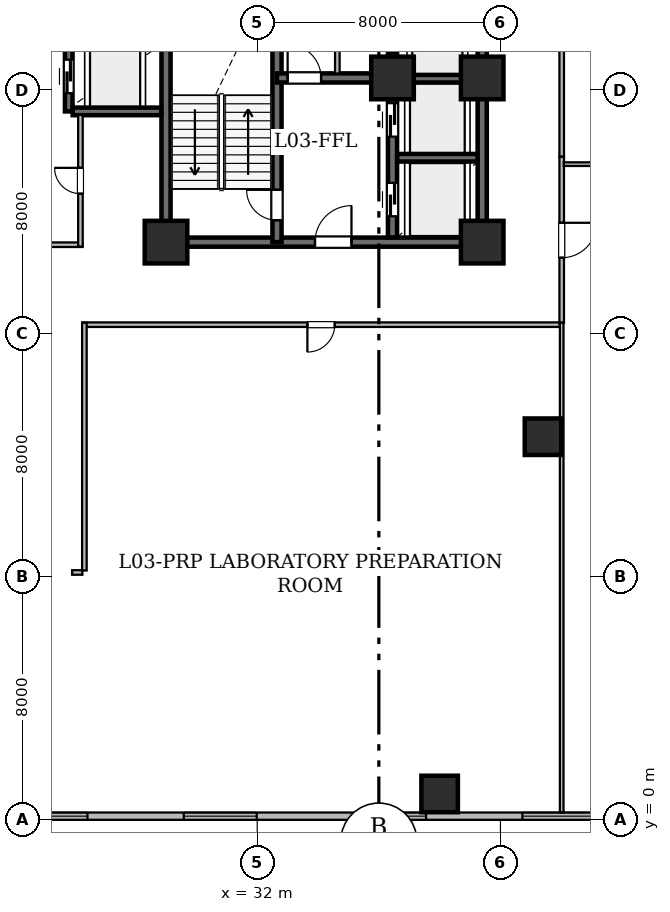
"""IFC4 building model, lengths in metres.
Left out: names, types, materials, properties, quantities, classifications, styles, units other than length and angle.
Written with IfcOpenShell. Run it as: python <this file> out.ifc"""

import sys

from ifc_helpers import new_model, si_unit, direction, frame, frame_2d, origin, origin_2d, place, context, subcontext, project, spatial, rectangle, hollow_rectangle, extrude, element, fill, save


model = new_model("IFC4")
c1 = context("Model", 3, precision=1e-05, world=origin(), true_north=direction((0.0, 1.0)))
c2 = subcontext(c1, "Body", "Model", "MODEL_VIEW")
j1 = project(units=[si_unit("LENGTHUNIT", "METRE"), si_unit("PLANEANGLEUNIT", "RADIAN")], contexts=[c1])
p1 = place(None, origin())
s1 = spatial("IfcSite", under=j1, at=p1, CompositionType="ELEMENT")
p2 = place(p1, origin())
s2 = spatial("IfcBuilding", under=s1, at=p2, CompositionType="ELEMENT")
p3 = place(p2, frame((0.0, 0.0, 16.2)))
s3 = spatial("IfcBuildingStorey", under=s2, at=p3, CompositionType="ELEMENT", Elevation=16.2)
for number, where, z_axis, x_axis in (
    (1, (29.0, 19.0, 0.0), (0.0, 0.0, 1.0), (1.0, 0.0, 0.0)),
    (2, (39.4, 19.0, 0.0), (0.0, 0.0, 1.0), (1.0, 0.0, 0.0)),
    (3, (36.45, 24.4, 0.0), (0.0, 0.0, 1.0), (1.0, 0.0, 0.0)),
    (4, (39.4, 24.4, 0.0), (0.0, 0.0, 1.0), (1.0, 0.0, 0.0)),
):
    element("IfcColumn", number, at=place(p3, frame(where, z_axis=z_axis, x_axis=x_axis)), inside=s3, PredefinedType="COLUMN", context=c2, shape_type="SweptSolid", body=[
        extrude(hollow_rectangle(XDim=1.4, YDim=1.4, WallThickness=0.07, at=origin_2d()), origin(), (0.0, 0.0, 1.0), 4.2),
    ])
for number, where, z_axis, x_axis in (
    (5, (38.0, 0.85, 0.0), (0.0, 0.0, 1.0), (1.0, 0.0, 0.0)),
    (6, (41.4, 12.6, 0.0), (0.0, 0.0, 1.0), (1.0, 0.0, 0.0)),
):
    element("IfcColumn", number, at=place(p3, frame(where, z_axis=z_axis, x_axis=x_axis)), inside=s3, PredefinedType="COLUMN", context=c2, shape_type="SweptSolid", body=[
        extrude(hollow_rectangle(XDim=1.2, YDim=1.2, WallThickness=0.06, at=origin_2d()), origin(), (0.0, 0.0, 1.0), 4.2),
    ])
p4 = place(p3, frame((50.275, 0.12, 0.0), z_axis=(0.0, 0.0, 1.0), x_axis=(-1.0, 0.0, 0.0)))
e7 = element("IfcWall", 7, at=p4, inside=s3, PredefinedType="STANDARD", context=c2, shape_type="SweptSolid", body=[
    extrude(rectangle(XDim=44.55, YDim=0.24, at=frame_2d((22.275, 0.0))), origin(), (0.0, 0.0, 1.0), 3.92),
])
p5 = place(p4, frame((1.584, 0.0, 0.9)))
e8 = element("IfcOpeningElement", 8, at=p5, cuts=e7, PredefinedType="OPENING", context=c2, shape_type="SweptSolid", body=[
    extrude(rectangle(XDim=2.4, YDim=1.7, at=frame_2d((1.2, 0.85))), frame((0.0, 0.13, 0.0), z_axis=(0.0, -1.0, 0.0), x_axis=(1.0, 0.0, 0.0)), (0.0, 0.0, 1.0), 0.26),
])
p6 = place(p4, frame((7.153, 0.0, 0.9)))
e9 = element("IfcOpeningElement", 9, at=p6, cuts=e7, PredefinedType="OPENING", context=c2, shape_type="SweptSolid", body=[
    extrude(rectangle(XDim=2.4, YDim=1.7, at=frame_2d((1.2, 0.85))), frame((0.0, 0.13, 0.0), z_axis=(0.0, -1.0, 0.0), x_axis=(1.0, 0.0, 0.0)), (0.0, 0.0, 1.0), 0.26),
])
p7 = place(p4, frame((12.722, 0.0, 0.9)))
e10 = element("IfcOpeningElement", 10, at=p7, cuts=e7, PredefinedType="OPENING", context=c2, shape_type="SweptSolid", body=[
    extrude(rectangle(XDim=2.4, YDim=1.7, at=frame_2d((1.2, 0.85))), frame((0.0, 0.13, 0.0), z_axis=(0.0, -1.0, 0.0), x_axis=(1.0, 0.0, 0.0)), (0.0, 0.0, 1.0), 0.26),
])
p8 = place(p4, frame((18.291, 0.0, 0.9)))
e11 = element("IfcOpeningElement", 11, at=p8, cuts=e7, PredefinedType="OPENING", context=c2, shape_type="SweptSolid", body=[
    extrude(rectangle(XDim=2.4, YDim=1.7, at=frame_2d((1.2, 0.85))), frame((0.0, 0.13, 0.0), z_axis=(0.0, -1.0, 0.0), x_axis=(1.0, 0.0, 0.0)), (0.0, 0.0, 1.0), 0.26),
])
p9 = place(p4, frame((23.859, 0.0, 0.9)))
e12 = element("IfcOpeningElement", 12, at=p9, cuts=e7, PredefinedType="OPENING", context=c2, shape_type="SweptSolid", body=[
    extrude(rectangle(XDim=2.4, YDim=1.7, at=frame_2d((1.2, 0.85))), frame((0.0, 0.13, 0.0), z_axis=(0.0, -1.0, 0.0), x_axis=(1.0, 0.0, 0.0)), (0.0, 0.0, 1.0), 0.26),
])
p10 = place(p4, frame((29.428, 0.0, 0.9)))
e13 = element("IfcOpeningElement", 13, at=p10, cuts=e7, PredefinedType="OPENING", context=c2, shape_type="SweptSolid", body=[
    extrude(rectangle(XDim=2.4, YDim=1.7, at=frame_2d((1.2, 0.85))), frame((0.0, 0.13, 0.0), z_axis=(0.0, -1.0, 0.0), x_axis=(1.0, 0.0, 0.0)), (0.0, 0.0, 1.0), 0.26),
])
p11 = place(p4, frame((34.997, 0.0, 0.9)))
e14 = element("IfcOpeningElement", 14, at=p11, cuts=e7, PredefinedType="OPENING", context=c2, shape_type="SweptSolid", body=[
    extrude(rectangle(XDim=2.4, YDim=1.7, at=frame_2d((1.2, 0.85))), frame((0.0, 0.13, 0.0), z_axis=(0.0, -1.0, 0.0), x_axis=(1.0, 0.0, 0.0)), (0.0, 0.0, 1.0), 0.26),
])
p12 = place(p4, frame((40.566, 0.0, 0.9)))
e15 = element("IfcOpeningElement", 15, at=p12, cuts=e7, PredefinedType="OPENING", context=c2, shape_type="SweptSolid", body=[
    extrude(rectangle(XDim=2.4, YDim=1.7, at=frame_2d((1.2, 0.85))), frame((0.0, 0.13, 0.0), z_axis=(0.0, -1.0, 0.0), x_axis=(1.0, 0.0, 0.0)), (0.0, 0.0, 1.0), 0.26),
])
p13 = place(p3, frame((29.0, 19.0, 0.0), z_axis=(0.0, 0.0, 1.0), x_axis=(0.0, 1.0, 0.0)))
e16 = element("IfcWall", 16, at=p13, inside=s3, PredefinedType="SHEAR", context=c2, shape_type="SweptSolid", body=[
    extrude(rectangle(XDim=9.0, YDim=0.3, at=frame_2d((4.5, 0.0))), origin(), (0.0, 0.0, 1.0), 3.92),
])
p14 = place(p3, frame((29.0, 19.0, 0.0), z_axis=(0.0, 0.0, 1.0), x_axis=(1.0, 0.0, 0.0)))
e17 = element("IfcWall", 17, at=p14, inside=s3, PredefinedType="SHEAR", context=c2, shape_type="SweptSolid", body=[
    extrude(rectangle(XDim=10.4, YDim=0.3, at=frame_2d((5.2, 0.0))), origin(), (0.0, 0.0, 1.0), 3.92),
])
p15 = place(p14, frame((4.9, 0.0, 0.0)))
e18 = element("IfcOpeningElement", 18, at=p15, cuts=e17, PredefinedType="OPENING", context=c2, shape_type="SweptSolid", body=[
    extrude(rectangle(XDim=1.2, YDim=2.15, at=frame_2d((0.6, 1.075))), frame((0.0, 0.16, 0.0), z_axis=(0.0, -1.0, 0.0), x_axis=(1.0, 0.0, 0.0)), (0.0, 0.0, 1.0), 0.32),
])
p16 = place(p3, frame((39.4, 19.0, 0.0), z_axis=(0.0, 0.0, 1.0), x_axis=(0.0, 1.0, 0.0)))
e19 = element("IfcWall", 19, at=p16, inside=s3, PredefinedType="SHEAR", context=c2, shape_type="SweptSolid", body=[
    extrude(rectangle(XDim=5.4, YDim=0.3, at=frame_2d((2.7, 0.0))), origin(), (0.0, 0.0, 1.0), 3.92),
])
p17 = place(p3, frame((39.4, 24.4, 0.0), z_axis=(0.0, 0.0, 1.0), x_axis=(0.0, 1.0, 0.0)))
e20 = element("IfcWall", 20, at=p17, inside=s3, PredefinedType="SHEAR", context=c2, shape_type="SweptSolid", body=[
    extrude(rectangle(XDim=12.6, YDim=0.3, at=frame_2d((6.3, 0.0))), origin(), (0.0, 0.0, 1.0), 3.92),
])
p18 = place(p3, frame((32.65, 19.0, 0.0), z_axis=(0.0, 0.0, 1.0), x_axis=(0.0, 1.0, 0.0)))
e21 = element("IfcWall", 21, at=p18, inside=s3, PredefinedType="SHEAR", context=c2, shape_type="SweptSolid", body=[
    extrude(rectangle(XDim=9.0, YDim=0.3, at=frame_2d((4.5, 0.0))), origin(), (0.0, 0.0, 1.0), 3.92),
])
p19 = place(p18, frame((0.72, 0.0, 0.0)))
e22 = element("IfcOpeningElement", 22, at=p19, cuts=e21, PredefinedType="OPENING", context=c2, shape_type="SweptSolid", body=[
    extrude(rectangle(XDim=1.0, YDim=2.15, at=frame_2d((0.5, 1.075))), frame((0.0, 0.16, 0.0), z_axis=(0.0, -1.0, 0.0), x_axis=(1.0, 0.0, 0.0)), (0.0, 0.0, 1.0), 0.32),
])
p20 = place(p3, frame((32.65, 24.4, 0.0), z_axis=(0.0, 0.0, 1.0), x_axis=(1.0, 0.0, 0.0)))
e23 = element("IfcWall", 23, at=p20, inside=s3, PredefinedType="SHEAR", context=c2, shape_type="SweptSolid", body=[
    extrude(rectangle(XDim=3.8, YDim=0.3, at=frame_2d((1.9, 0.0))), origin(), (0.0, 0.0, 1.0), 3.92),
])
p21 = place(p20, frame((0.35, 0.0, 0.0)))
e24 = element("IfcOpeningElement", 24, at=p21, cuts=e23, PredefinedType="OPENING", context=c2, shape_type="SweptSolid", body=[
    extrude(rectangle(XDim=1.1, YDim=2.15, at=frame_2d((0.55, 1.075))), frame((0.0, 0.16, 0.0), z_axis=(0.0, -1.0, 0.0), x_axis=(1.0, 0.0, 0.0)), (0.0, 0.0, 1.0), 0.32),
])
p22 = place(p3, frame((36.45, 19.154, 0.0), z_axis=(0.0, 0.0, 1.0), x_axis=(0.0, 1.0, 0.0)))
e25 = element("IfcWall", 25, at=p22, inside=s3, PredefinedType="SHEAR", context=c2, shape_type="SweptSolid", body=[
    extrude(rectangle(XDim=4.546, YDim=0.3, at=frame_2d((2.273, 0.0))), origin(), (0.0, 0.0, 1.0), 3.92),
])
p23 = place(p22, frame((0.696, 0.0, 0.0)))
e26 = element("IfcOpeningElement", 26, at=p23, cuts=e25, PredefinedType="OPENING", context=c2, shape_type="SweptSolid", body=[
    extrude(rectangle(XDim=1.1, YDim=2.15, at=frame_2d((0.55, 1.075))), frame((0.0, 0.16, 0.0), z_axis=(0.0, -1.0, 0.0), x_axis=(1.0, 0.0, 0.0)), (0.0, 0.0, 1.0), 0.32),
])
p24 = place(p22, frame((3.316, 0.0, 0.0)))
e27 = element("IfcOpeningElement", 27, at=p24, cuts=e25, PredefinedType="OPENING", context=c2, shape_type="SweptSolid", body=[
    extrude(rectangle(XDim=1.1, YDim=2.15, at=frame_2d((0.55, 1.075))), frame((0.0, 0.16, 0.0), z_axis=(0.0, -1.0, 0.0), x_axis=(1.0, 0.0, 0.0)), (0.0, 0.0, 1.0), 0.32),
])
p25 = place(p3, frame((36.45, 25.1, 0.0), z_axis=(0.0, 0.0, 1.0), x_axis=(0.0, 1.0, 0.0)))
e28 = element("IfcWall", 28, at=p25, inside=s3, PredefinedType="SHEAR", context=c2, shape_type="SweptSolid", body=[
    extrude(rectangle(XDim=4.95, YDim=0.3, at=frame_2d((2.475, 0.0))), origin(), (0.0, 0.0, 1.0), 3.92),
])
p26 = place(p25, frame((0.12, 0.0, 0.0)))
e29 = element("IfcOpeningElement", 29, at=p26, cuts=e28, PredefinedType="OPENING", context=c2, shape_type="SweptSolid", body=[
    extrude(rectangle(XDim=1.05, YDim=2.15, at=frame_2d((0.525, 1.075))), frame((0.0, 0.16, 0.0), z_axis=(0.0, -1.0, 0.0), x_axis=(1.0, 0.0, 0.0)), (0.0, 0.0, 1.0), 0.32),
])
p27 = place(p25, frame((1.995, 0.0, 0.0)))
e30 = element("IfcOpeningElement", 30, at=p27, cuts=e28, PredefinedType="OPENING", context=c2, shape_type="SweptSolid", body=[
    extrude(rectangle(XDim=1.05, YDim=2.15, at=frame_2d((0.525, 1.075))), frame((0.0, 0.16, 0.0), z_axis=(0.0, -1.0, 0.0), x_axis=(1.0, 0.0, 0.0)), (0.0, 0.0, 1.0), 0.32),
])
p28 = place(p25, frame((3.795, 0.0, 0.0)))
e31 = element("IfcOpeningElement", 31, at=p28, cuts=e28, PredefinedType="OPENING", context=c2, shape_type="SweptSolid", body=[
    extrude(rectangle(XDim=1.05, YDim=2.15, at=frame_2d((0.525, 1.075))), frame((0.0, 0.16, 0.0), z_axis=(0.0, -1.0, 0.0), x_axis=(1.0, 0.0, 0.0)), (0.0, 0.0, 1.0), 0.32),
])
for number, where, z_axis, x_axis in (
    (32, (36.604, 21.775, 0.0), (0.0, 0.0, 1.0), (1.0, 0.0, 0.0)),
    (33, (36.604, 24.375, 0.0), (0.0, 0.0, 1.0), (1.0, 0.0, 0.0)),
):
    element("IfcWall", number, at=place(p3, frame(where, z_axis=z_axis, x_axis=x_axis)), inside=s3, PredefinedType="SHEAR", context=c2, shape_type="SweptSolid", body=[
        extrude(rectangle(XDim=2.642, YDim=0.25, at=frame_2d((1.321, 0.0))), origin(), (0.0, 0.0, 1.0), 3.92),
    ])
p29 = place(p3, frame((25.8, 23.3, 0.0), z_axis=(0.0, 0.0, 1.0), x_axis=(0.0, 1.0, 0.0)))
e34 = element("IfcWall", 34, at=p29, inside=s3, PredefinedType="SHEAR", context=c2, shape_type="SweptSolid", body=[
    extrude(rectangle(XDim=4.55, YDim=0.25, at=frame_2d((2.275, 0.0))), origin(), (0.0, 0.0, 1.0), 3.92),
])
p30 = place(p29, frame((0.6, 0.0, 0.0)))
e35 = element("IfcOpeningElement", 35, at=p30, cuts=e34, PredefinedType="OPENING", context=c2, shape_type="SweptSolid", body=[
    extrude(rectangle(XDim=1.1, YDim=2.15, at=frame_2d((0.55, 1.075))), frame((0.0, 0.135, 0.0), z_axis=(0.0, -1.0, 0.0), x_axis=(1.0, 0.0, 0.0)), (0.0, 0.0, 1.0), 0.27),
])
p31 = place(p29, frame((2.85, 0.0, 0.0)))
e36 = element("IfcOpeningElement", 36, at=p31, cuts=e34, PredefinedType="OPENING", context=c2, shape_type="SweptSolid", body=[
    extrude(rectangle(XDim=1.1, YDim=2.15, at=frame_2d((0.55, 1.075))), frame((0.0, 0.135, 0.0), z_axis=(0.0, -1.0, 0.0), x_axis=(1.0, 0.0, 0.0)), (0.0, 0.0, 1.0), 0.27),
])
p32 = place(p3, frame((25.929, 23.3, 0.0), z_axis=(0.0, 0.0, 1.0), x_axis=(1.0, 0.0, 0.0)))
e37 = element("IfcWall", 37, at=p32, inside=s3, PredefinedType="SHEAR", context=c2, shape_type="SweptSolid", body=[
    extrude(rectangle(XDim=2.917, YDim=0.25, at=frame_2d((1.458, 0.0))), origin(), (0.0, 0.0, 1.0), 3.92),
])
p33 = place(p3, frame((34.635, 24.544, 0.0), z_axis=(0.0, 0.0, 1.0), x_axis=(0.0, 1.0, 0.0)))
e38 = element("IfcWall", 38, at=p33, inside=s3, PredefinedType="STANDARD", context=c2, shape_type="SweptSolid", body=[
    extrude(rectangle(XDim=3.456, YDim=0.15, at=frame_2d((1.728, 0.0))), origin(), (0.0, 0.0, 1.0), 3.92),
])
p34 = place(p33, frame((1.278, 0.0, 0.0)))
e39 = element("IfcOpeningElement", 39, at=p34, cuts=e38, PredefinedType="OPENING", context=c2, shape_type="SweptSolid", body=[
    extrude(rectangle(XDim=0.9, YDim=2.1, at=frame_2d((0.45, 1.05))), frame((0.0, 0.085, 0.0), z_axis=(0.0, -1.0, 0.0), x_axis=(1.0, 0.0, 0.0)), (0.0, 0.0, 1.0), 0.17),
])
p35 = place(p3, frame((23.267, 18.915, 0.0), z_axis=(0.0, 0.0, 1.0), x_axis=(1.0, 0.0, 0.0)))
e40 = element("IfcWall", 40, at=p35, inside=s3, PredefinedType="STANDARD", context=c2, shape_type="SweptSolid", body=[
    extrude(rectangle(XDim=2.983, YDim=0.15, at=frame_2d((1.491, 0.0))), origin(), (0.0, 0.0, 1.0), 3.92),
])
p36 = place(p3, frame((26.185, 18.852, 0.0), z_axis=(0.0, 0.0, 1.0), x_axis=(0.0, 1.0, 0.0)))
e41 = element("IfcWall", 41, at=p36, inside=s3, PredefinedType="STANDARD", context=c2, shape_type="SweptSolid", body=[
    extrude(rectangle(XDim=4.331, YDim=0.15, at=frame_2d((2.166, 0.0))), origin(), (0.0, 0.0, 1.0), 3.92),
])
p37 = place(p36, frame((1.741, 0.0, 0.0)))
e42 = element("IfcOpeningElement", 42, at=p37, cuts=e41, PredefinedType="OPENING", context=c2, shape_type="SweptSolid", body=[
    extrude(rectangle(XDim=0.85, YDim=2.1, at=frame_2d((0.425, 1.05))), frame((0.0, 0.085, 0.0), z_axis=(0.0, -1.0, 0.0), x_axis=(1.0, 0.0, 0.0)), (0.0, 0.0, 1.0), 0.17),
])
p38 = place(p3, frame((42.015, 21.814, 0.0), z_axis=(0.0, 0.0, 1.0), x_axis=(0.0, -1.0, 0.0)))
e43 = element("IfcWall", 43, at=p38, inside=s3, PredefinedType="STANDARD", context=c2, shape_type="SweptSolid", body=[
    extrude(rectangle(XDim=5.464, YDim=0.15, at=frame_2d((2.732, 0.0))), origin(), (0.0, 0.0, 1.0), 3.055),
])
p39 = place(p38, frame((2.178, 0.0, 0.0)))
e44 = element("IfcOpeningElement", 44, at=p39, cuts=e43, PredefinedType="OPENING", context=c2, shape_type="SweptSolid", body=[
    extrude(rectangle(XDim=1.15, YDim=2.2, at=frame_2d((0.575, 1.1))), frame((0.0, 0.085, 0.0), z_axis=(0.0, -1.0, 0.0), x_axis=(1.0, 0.0, 0.0)), (0.0, 0.0, 1.0), 0.17),
])
p40 = place(p3, frame((42.015, 37.314, 0.0), z_axis=(0.0, 0.0, 1.0), x_axis=(0.0, -1.0, 0.0)))
e45 = element("IfcWall", 45, at=p40, inside=s3, PredefinedType="STANDARD", context=c2, shape_type="SweptSolid", body=[
    extrude(rectangle(XDim=15.5, YDim=0.15, at=frame_2d((7.75, 0.0))), origin(), (0.0, 0.0, 1.0), 3.055),
])
p41 = place(p40, frame((7.196, 0.0, 0.0)))
e46 = element("IfcOpeningElement", 46, at=p41, cuts=e45, PredefinedType="OPENING", context=c2, shape_type="SweptSolid", body=[
    extrude(rectangle(XDim=1.15, YDim=2.2, at=frame_2d((0.575, 1.1))), frame((0.0, 0.085, 0.0), z_axis=(0.0, -1.0, 0.0), x_axis=(1.0, 0.0, 0.0)), (0.0, 0.0, 1.0), 0.17),
])
p42 = place(p3, frame((41.95, 16.285, 0.0), z_axis=(0.0, 0.0, 1.0), x_axis=(-1.0, 0.0, 0.0)))
e47 = element("IfcWall", 47, at=p42, inside=s3, PredefinedType="STANDARD", context=c2, shape_type="SweptSolid", body=[
    extrude(rectangle(XDim=15.7, YDim=0.15, at=frame_2d((7.85, 0.0))), origin(), (0.0, 0.0, 1.0), 3.055),
])
p43 = place(p42, frame((7.4, 0.0, 0.0)))
e48 = element("IfcOpeningElement", 48, at=p43, cuts=e47, PredefinedType="OPENING", context=c2, shape_type="SweptSolid", body=[
    extrude(rectangle(XDim=0.9, YDim=2.1, at=frame_2d((0.45, 1.05))), frame((0.0, 0.085, 0.0), z_axis=(0.0, -1.0, 0.0), x_axis=(1.0, 0.0, 0.0)), (0.0, 0.0, 1.0), 0.17),
])
p44 = place(p3, frame((26.315, 16.35, 0.0), z_axis=(0.0, 0.0, 1.0), x_axis=(0.0, -1.0, 0.0)))
e49 = element("IfcWall", 49, at=p44, inside=s3, PredefinedType="STANDARD", context=c2, shape_type="SweptSolid", body=[
    extrude(rectangle(XDim=8.15, YDim=0.15, at=frame_2d((4.075, 0.0))), origin(), (0.0, 0.0, 1.0), 3.055),
])
p45 = place(p3, frame((26.25, 8.135, 0.0), z_axis=(0.0, 0.0, 1.0), x_axis=(-1.0, 0.0, 0.0)))
e50 = element("IfcWall", 50, at=p45, inside=s3, PredefinedType="STANDARD", context=c2, shape_type="SweptSolid", body=[
    extrude(rectangle(XDim=0.339, YDim=0.15, at=frame_2d((0.169, 0.0))), origin(), (0.0, 0.0, 1.0), 3.92),
])
p46 = place(p3, frame((42.082, 21.565, 0.0), z_axis=(0.0, 0.0, 1.0), x_axis=(1.0, 0.0, 0.0)))
e51 = element("IfcWall", 51, at=p46, inside=s3, PredefinedType="PARTITIONING", context=c2, shape_type="SweptSolid", body=[
    extrude(rectangle(XDim=13.686, YDim=0.12, at=frame_2d((6.843, 0.0))), origin(), (0.0, 0.0, 1.0), 3.055),
])
p47 = place(p3, frame((42.015, 0.243, 0.0), z_axis=(0.0, 0.0, 1.0), x_axis=(0.0, 1.0, 0.0)))
e52 = element("IfcWall", 52, at=p47, inside=s3, PredefinedType="PARTITIONING", context=c2, shape_type="SweptSolid", body=[
    extrude(rectangle(XDim=16.107, YDim=0.12, at=frame_2d((8.054, 0.0))), origin(), (0.0, 0.0, 1.0), 3.055),
])
p48 = place(p6, origin())
e53 = element("IfcWindow", 53, at=p48, inside=s3, PartitioningType="SINGLE_PANEL", PredefinedType="WINDOW", context=c2, shape_type="SweptSolid", body=[
    extrude(rectangle(XDim=2.4, YDim=1.7, at=frame_2d((1.2, 0.85))), frame((0.0, 0.03, 0.0), z_axis=(0.0, -1.0, 0.0), x_axis=(1.0, 0.0, 0.0)), (0.0, 0.0, 1.0), 0.06),
])
fill(e9, e53)
p49 = place(p7, origin())
e54 = element("IfcWindow", 54, at=p49, inside=s3, PartitioningType="SINGLE_PANEL", PredefinedType="WINDOW", context=c2, shape_type="SweptSolid", body=[
    extrude(rectangle(XDim=2.4, YDim=1.7, at=frame_2d((1.2, 0.85))), frame((0.0, 0.03, 0.0), z_axis=(0.0, -1.0, 0.0), x_axis=(1.0, 0.0, 0.0)), (0.0, 0.0, 1.0), 0.06),
])
fill(e10, e54)
p50 = place(p8, origin())
e55 = element("IfcWindow", 55, at=p50, inside=s3, PartitioningType="SINGLE_PANEL", PredefinedType="WINDOW", context=c2, shape_type="SweptSolid", body=[
    extrude(rectangle(XDim=2.4, YDim=1.7, at=frame_2d((1.2, 0.85))), frame((0.0, 0.03, 0.0), z_axis=(0.0, -1.0, 0.0), x_axis=(1.0, 0.0, 0.0)), (0.0, 0.0, 1.0), 0.06),
])
fill(e11, e55)
p51 = place(p9, origin())
e56 = element("IfcWindow", 56, at=p51, inside=s3, PartitioningType="SINGLE_PANEL", PredefinedType="WINDOW", context=c2, shape_type="SweptSolid", body=[
    extrude(rectangle(XDim=2.4, YDim=1.7, at=frame_2d((1.2, 0.85))), frame((0.0, 0.03, 0.0), z_axis=(0.0, -1.0, 0.0), x_axis=(1.0, 0.0, 0.0)), (0.0, 0.0, 1.0), 0.06),
])
fill(e12, e56)
p52 = place(p19, origin())
e57 = element("IfcDoor", 57, at=p52, inside=s3, OperationType="SINGLE_SWING_RIGHT", PredefinedType="DOOR", context=c2, shape_type="SweptSolid", body=[
    extrude(rectangle(XDim=1.0, YDim=2.15, at=frame_2d((0.5, 1.075))), frame((0.0, 0.025, 0.0), z_axis=(0.0, -1.0, 0.0), x_axis=(1.0, 0.0, 0.0)), (0.0, 0.0, 1.0), 0.05),
])
fill(e22, e57)
p53 = place(p21, origin())
e58 = element("IfcDoor", 58, at=p53, inside=s3, OperationType="SINGLE_SWING_LEFT", PredefinedType="DOOR", context=c2, shape_type="SweptSolid", body=[
    extrude(rectangle(XDim=1.1, YDim=2.15, at=frame_2d((0.55, 1.075))), frame((0.0, 0.025, 0.0), z_axis=(0.0, -1.0, 0.0), x_axis=(1.0, 0.0, 0.0)), (0.0, 0.0, 1.0), 0.05),
])
fill(e24, e58)
p54 = place(p15, origin())
e59 = element("IfcDoor", 59, at=p54, inside=s3, OperationType="SINGLE_SWING_RIGHT", PredefinedType="DOOR", context=c2, shape_type="SweptSolid", body=[
    extrude(rectangle(XDim=1.2, YDim=2.15, at=frame_2d((0.6, 1.075))), frame((0.0, 0.025, 0.0), z_axis=(0.0, -1.0, 0.0), x_axis=(1.0, 0.0, 0.0)), (0.0, 0.0, 1.0), 0.05),
])
fill(e18, e59)
p55 = place(p23, origin())
e60 = element("IfcDoor", 60, at=p55, inside=s3, OperationType="SLIDING_TO_LEFT", PredefinedType="DOOR", context=c2, shape_type="SweptSolid", body=[
    extrude(rectangle(XDim=1.1, YDim=2.15, at=frame_2d((0.55, 1.075))), frame((0.0, 0.025, 0.0), z_axis=(0.0, -1.0, 0.0), x_axis=(1.0, 0.0, 0.0)), (0.0, 0.0, 1.0), 0.05),
])
fill(e26, e60)
p56 = place(p24, origin())
e61 = element("IfcDoor", 61, at=p56, inside=s3, OperationType="SLIDING_TO_LEFT", PredefinedType="DOOR", context=c2, shape_type="SweptSolid", body=[
    extrude(rectangle(XDim=1.1, YDim=2.15, at=frame_2d((0.55, 1.075))), frame((0.0, 0.025, 0.0), z_axis=(0.0, -1.0, 0.0), x_axis=(1.0, 0.0, 0.0)), (0.0, 0.0, 1.0), 0.05),
])
fill(e27, e61)
p57 = place(p26, origin())
e62 = element("IfcDoor", 62, at=p57, inside=s3, OperationType="SLIDING_TO_LEFT", PredefinedType="DOOR", context=c2, shape_type="SweptSolid", body=[
    extrude(rectangle(XDim=1.05, YDim=2.15, at=frame_2d((0.525, 1.075))), frame((0.0, 0.025, 0.0), z_axis=(0.0, -1.0, 0.0), x_axis=(1.0, 0.0, 0.0)), (0.0, 0.0, 1.0), 0.05),
])
fill(e29, e62)
p58 = place(p30, origin())
e63 = element("IfcDoor", 63, at=p58, inside=s3, OperationType="SLIDING_TO_LEFT", PredefinedType="DOOR", context=c2, shape_type="SweptSolid", body=[
    extrude(rectangle(XDim=1.1, YDim=2.15, at=frame_2d((0.55, 1.075))), frame((0.0, 0.025, 0.0), z_axis=(0.0, -1.0, 0.0), x_axis=(1.0, 0.0, 0.0)), (0.0, 0.0, 1.0), 0.05),
])
fill(e35, e63)
p59 = place(p37, origin())
e64 = element("IfcDoor", 64, at=p59, inside=s3, OperationType="SINGLE_SWING_RIGHT", PredefinedType="DOOR", context=c2, shape_type="SweptSolid", body=[
    extrude(rectangle(XDim=0.85, YDim=2.1, at=frame_2d((0.425, 1.05))), frame((0.0, 0.025, 0.0), z_axis=(0.0, -1.0, 0.0), x_axis=(1.0, 0.0, 0.0)), (0.0, 0.0, 1.0), 0.05),
])
fill(e42, e64)
p60 = place(p39, origin())
e65 = element("IfcDoor", 65, at=p60, inside=s3, OperationType="SINGLE_SWING_LEFT", PredefinedType="DOOR", context=c2, shape_type="SweptSolid", body=[
    extrude(rectangle(XDim=1.15, YDim=2.2, at=frame_2d((0.575, 1.1))), frame((0.0, 0.025, 0.0), z_axis=(0.0, -1.0, 0.0), x_axis=(1.0, 0.0, 0.0)), (0.0, 0.0, 1.0), 0.05),
])
fill(e44, e65)
p61 = place(p43, origin())
e66 = element("IfcDoor", 66, at=p61, inside=s3, OperationType="SINGLE_SWING_RIGHT", PredefinedType="DOOR", context=c2, shape_type="SweptSolid", body=[
    extrude(rectangle(XDim=0.9, YDim=2.1, at=frame_2d((0.45, 1.05))), frame((0.0, 0.025, 0.0), z_axis=(0.0, -1.0, 0.0), x_axis=(1.0, 0.0, 0.0)), (0.0, 0.0, 1.0), 0.05),
])
fill(e48, e66)
save(model, sys.argv[1])
